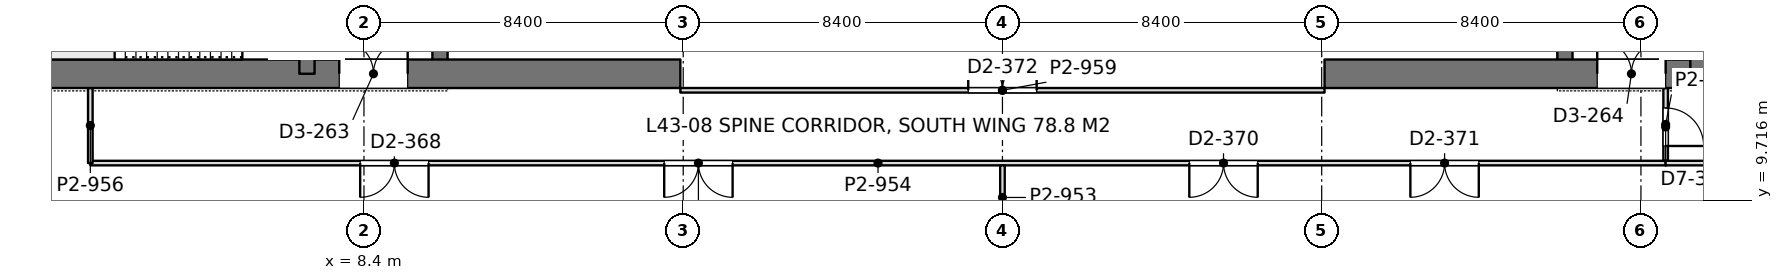
"""IFC4 building model, lengths in metres.
Left out: names, types, materials, properties, quantities, classifications, styles, units other than length and angle.
Written with IfcOpenShell. Run it as: python <this file> out.ifc"""

import sys

from ifc_helpers import new_model, si_unit, direction, frame, frame_2d, origin, place, context, subcontext, project, spatial, rectangle, extrude, element, fill, save


model = new_model("IFC4")
c1 = context("Model", 3, precision=1e-05, world=origin(), true_north=direction((0.0, 1.0)))
c2 = subcontext(c1, "Body", "Model", "MODEL_VIEW")
j1 = project(units=[si_unit("LENGTHUNIT", "METRE"), si_unit("PLANEANGLEUNIT", "RADIAN")], contexts=[c1])
p1 = place(None, origin())
s1 = spatial("IfcSite", under=j1, at=p1, CompositionType="ELEMENT")
p2 = place(p1, origin())
s2 = spatial("IfcBuilding", under=s1, at=p2, CompositionType="ELEMENT")
p3 = place(p2, frame((0.0, 0.0, 190.2)))
s3 = spatial("IfcBuildingStorey", under=s2, at=p3, CompositionType="ELEMENT", Elevation=190.2)
p4 = place(p3, frame((-1.125, 13.05, 0.0), z_axis=(0.0, 0.0, 1.0), x_axis=(1.0, 0.0, 0.0)))
e1 = element("IfcWall", 1, at=p4, inside=s3, PredefinedType="SHEAR", context=c2, shape_type="SweptSolid", body=[
    extrude(rectangle(XDim=17.85, YDim=0.75, at=frame_2d((8.925, 0.0))), origin(), (0.0, 0.0, 1.0), 4.2),
])
p5 = place(p4, frame((8.875, 0.0, 0.0)))
e2 = element("IfcOpeningElement", 2, at=p5, cuts=e1, PredefinedType="OPENING", context=c2, shape_type="SweptSolid", body=[
    extrude(rectangle(XDim=1.8, YDim=2.4, at=frame_2d((0.9, 1.2))), frame((0.0, 0.385, 0.0), z_axis=(0.0, -1.0, 0.0), x_axis=(1.0, 0.0, 0.0)), (0.0, 0.0, 1.0), 0.77),
])
p6 = place(p3, frame((6.9, 13.05, 0.0), z_axis=(0.0, 0.0, 1.0), x_axis=(0.0, 1.0, 0.0)))
e3 = element("IfcWall", 3, at=p6, inside=s3, PredefinedType="SHEAR", context=c2, shape_type="SweptSolid", body=[
    extrude(rectangle(XDim=24.3, YDim=0.4, at=frame_2d((12.15, 0.0))), origin(), (0.0, 0.0, 1.0), 4.2),
])
p7 = place(p6, frame((1.3, 0.0, 0.0)))
e4 = element("IfcOpeningElement", 4, at=p7, cuts=e3, PredefinedType="OPENING", context=c2, shape_type="SweptSolid", body=[
    extrude(rectangle(XDim=1.0, YDim=2.2, at=frame_2d((0.5, 1.1))), frame((0.0, 0.21, 0.0), z_axis=(0.0, -1.0, 0.0), x_axis=(1.0, 0.0, 0.0)), (0.0, 0.0, 1.0), 0.42),
])
p8 = place(p6, frame((22.0, 0.0, 0.0)))
e5 = element("IfcOpeningElement", 5, at=p8, cuts=e3, PredefinedType="OPENING", context=c2, shape_type="SweptSolid", body=[
    extrude(rectangle(XDim=1.0, YDim=2.2, at=frame_2d((0.5, 1.1))), frame((0.0, 0.21, 0.0), z_axis=(0.0, -1.0, 0.0), x_axis=(1.0, 0.0, 0.0)), (0.0, 0.0, 1.0), 0.42),
])
p9 = place(p6, frame((5.55, 0.0, 0.0)))
e6 = element("IfcOpeningElement", 6, at=p9, cuts=e3, PredefinedType="OPENING", context=c2, shape_type="SweptSolid", body=[
    extrude(rectangle(XDim=1.0, YDim=2.2, at=frame_2d((0.5, 1.1))), frame((0.0, 0.21, 0.0), z_axis=(0.0, -1.0, 0.0), x_axis=(1.0, 0.0, 0.0)), (0.0, 0.0, 1.0), 0.42),
])
p10 = place(p6, frame((9.55, 0.0, 0.0)))
e7 = element("IfcOpeningElement", 7, at=p10, cuts=e3, PredefinedType="OPENING", context=c2, shape_type="SweptSolid", body=[
    extrude(rectangle(XDim=1.0, YDim=2.2, at=frame_2d((0.5, 1.1))), frame((0.0, 0.21, 0.0), z_axis=(0.0, -1.0, 0.0), x_axis=(1.0, 0.0, 0.0)), (0.0, 0.0, 1.0), 0.42),
])
p11 = place(p6, frame((12.8, 0.0, 0.0)))
e8 = element("IfcOpeningElement", 8, at=p11, cuts=e3, PredefinedType="OPENING", context=c2, shape_type="SweptSolid", body=[
    extrude(rectangle(XDim=1.1, YDim=2.2, at=frame_2d((0.55, 1.1))), frame((0.0, 0.21, 0.0), z_axis=(0.0, -1.0, 0.0), x_axis=(1.0, 0.0, 0.0)), (0.0, 0.0, 1.0), 0.42),
])
p12 = place(p6, frame((15.538, 0.0, 0.0)))
e9 = element("IfcOpeningElement", 9, at=p12, cuts=e3, PredefinedType="OPENING", context=c2, shape_type="SweptSolid", body=[
    extrude(rectangle(XDim=1.1, YDim=2.2, at=frame_2d((0.55, 1.1))), frame((0.0, 0.21, 0.0), z_axis=(0.0, -1.0, 0.0), x_axis=(1.0, 0.0, 0.0)), (0.0, 0.0, 1.0), 0.42),
])
p13 = place(p6, frame((18.262, 0.0, 0.0)))
e10 = element("IfcOpeningElement", 10, at=p13, cuts=e3, PredefinedType="OPENING", context=c2, shape_type="SweptSolid", body=[
    extrude(rectangle(XDim=1.1, YDim=2.2, at=frame_2d((0.55, 1.1))), frame((0.0, 0.21, 0.0), z_axis=(0.0, -1.0, 0.0), x_axis=(1.0, 0.0, 0.0)), (0.0, 0.0, 1.0), 0.42),
])
p14 = place(p3, frame((10.4, 13.05, 0.0), z_axis=(0.0, 0.0, 1.0), x_axis=(0.0, 1.0, 0.0)))
e11 = element("IfcWall", 11, at=p14, inside=s3, PredefinedType="SHEAR", context=c2, shape_type="SweptSolid", body=[
    extrude(rectangle(XDim=24.3, YDim=0.4, at=frame_2d((12.15, 0.0))), origin(), (0.0, 0.0, 1.0), 4.2),
])
p15 = place(p14, frame((15.75, 0.0, 0.0)))
e12 = element("IfcOpeningElement", 12, at=p15, cuts=e11, PredefinedType="OPENING", context=c2, shape_type="SweptSolid", body=[
    extrude(rectangle(XDim=1.1, YDim=2.2, at=frame_2d((0.55, 1.1))), frame((0.0, 0.21, 0.0), z_axis=(0.0, -1.0, 0.0), x_axis=(1.0, 0.0, 0.0)), (0.0, 0.0, 1.0), 0.42),
])
p16 = place(p14, frame((18.6, 0.0, 0.0)))
e13 = element("IfcOpeningElement", 13, at=p16, cuts=e11, PredefinedType="OPENING", context=c2, shape_type="SweptSolid", body=[
    extrude(rectangle(XDim=1.1, YDim=2.2, at=frame_2d((0.55, 1.1))), frame((0.0, 0.21, 0.0), z_axis=(0.0, -1.0, 0.0), x_axis=(1.0, 0.0, 0.0)), (0.0, 0.0, 1.0), 0.42),
])
p17 = place(p14, frame((21.45, 0.0, 0.0)))
e14 = element("IfcOpeningElement", 14, at=p17, cuts=e11, PredefinedType="OPENING", context=c2, shape_type="SweptSolid", body=[
    extrude(rectangle(XDim=1.1, YDim=2.2, at=frame_2d((0.55, 1.1))), frame((0.0, 0.21, 0.0), z_axis=(0.0, -1.0, 0.0), x_axis=(1.0, 0.0, 0.0)), (0.0, 0.0, 1.0), 0.42),
])
p18 = place(p14, frame((8.65, 0.0, 0.0)))
e15 = element("IfcOpeningElement", 15, at=p18, cuts=e11, PredefinedType="OPENING", context=c2, shape_type="SweptSolid", body=[
    extrude(rectangle(XDim=1.8, YDim=2.4, at=frame_2d((0.9, 1.2))), frame((0.0, 0.21, 0.0), z_axis=(0.0, -1.0, 0.0), x_axis=(1.0, 0.0, 0.0)), (0.0, 0.0, 1.0), 0.42),
])
p19 = place(p3, frame((33.675, 13.05, 0.0), z_axis=(0.0, 0.0, 1.0), x_axis=(1.0, 0.0, 0.0)))
e16 = element("IfcWall", 16, at=p19, inside=s3, PredefinedType="SHEAR", context=c2, shape_type="SweptSolid", body=[
    extrude(rectangle(XDim=17.85, YDim=0.75, at=frame_2d((8.925, 0.0))), origin(), (0.0, 0.0, 1.0), 4.2),
])
p20 = place(p19, frame((7.175, 0.0, 0.0)))
e17 = element("IfcOpeningElement", 17, at=p20, cuts=e16, PredefinedType="OPENING", context=c2, shape_type="SweptSolid", body=[
    extrude(rectangle(XDim=1.8, YDim=2.4, at=frame_2d((0.9, 1.2))), frame((0.0, 0.385, 0.0), z_axis=(0.0, -1.0, 0.0), x_axis=(1.0, 0.0, 0.0)), (0.0, 0.0, 1.0), 0.77),
])
p21 = place(p3, frame((43.5, 13.05, 0.0), z_axis=(0.0, 0.0, 1.0), x_axis=(0.0, 1.0, 0.0)))
e18 = element("IfcWall", 18, at=p21, inside=s3, PredefinedType="SHEAR", context=c2, shape_type="SweptSolid", body=[
    extrude(rectangle(XDim=24.3, YDim=0.4, at=frame_2d((12.15, 0.0))), origin(), (0.0, 0.0, 1.0), 4.2),
])
p22 = place(p21, frame((1.3, 0.0, 0.0)))
e19 = element("IfcOpeningElement", 19, at=p22, cuts=e18, PredefinedType="OPENING", context=c2, shape_type="SweptSolid", body=[
    extrude(rectangle(XDim=1.0, YDim=2.2, at=frame_2d((0.5, 1.1))), frame((0.0, 0.21, 0.0), z_axis=(0.0, -1.0, 0.0), x_axis=(1.0, 0.0, 0.0)), (0.0, 0.0, 1.0), 0.42),
])
p23 = place(p21, frame((22.0, 0.0, 0.0)))
e20 = element("IfcOpeningElement", 20, at=p23, cuts=e18, PredefinedType="OPENING", context=c2, shape_type="SweptSolid", body=[
    extrude(rectangle(XDim=1.0, YDim=2.2, at=frame_2d((0.5, 1.1))), frame((0.0, 0.21, 0.0), z_axis=(0.0, -1.0, 0.0), x_axis=(1.0, 0.0, 0.0)), (0.0, 0.0, 1.0), 0.42),
])
p24 = place(p21, frame((5.55, 0.0, 0.0)))
e21 = element("IfcOpeningElement", 21, at=p24, cuts=e18, PredefinedType="OPENING", context=c2, shape_type="SweptSolid", body=[
    extrude(rectangle(XDim=1.0, YDim=2.2, at=frame_2d((0.5, 1.1))), frame((0.0, 0.21, 0.0), z_axis=(0.0, -1.0, 0.0), x_axis=(1.0, 0.0, 0.0)), (0.0, 0.0, 1.0), 0.42),
])
p25 = place(p21, frame((9.55, 0.0, 0.0)))
e22 = element("IfcOpeningElement", 22, at=p25, cuts=e18, PredefinedType="OPENING", context=c2, shape_type="SweptSolid", body=[
    extrude(rectangle(XDim=1.0, YDim=2.2, at=frame_2d((0.5, 1.1))), frame((0.0, 0.21, 0.0), z_axis=(0.0, -1.0, 0.0), x_axis=(1.0, 0.0, 0.0)), (0.0, 0.0, 1.0), 0.42),
])
p26 = place(p21, frame((12.8, 0.0, 0.0)))
e23 = element("IfcOpeningElement", 23, at=p26, cuts=e18, PredefinedType="OPENING", context=c2, shape_type="SweptSolid", body=[
    extrude(rectangle(XDim=1.1, YDim=2.2, at=frame_2d((0.55, 1.1))), frame((0.0, 0.21, 0.0), z_axis=(0.0, -1.0, 0.0), x_axis=(1.0, 0.0, 0.0)), (0.0, 0.0, 1.0), 0.42),
])
p27 = place(p21, frame((15.538, 0.0, 0.0)))
e24 = element("IfcOpeningElement", 24, at=p27, cuts=e18, PredefinedType="OPENING", context=c2, shape_type="SweptSolid", body=[
    extrude(rectangle(XDim=1.1, YDim=2.2, at=frame_2d((0.55, 1.1))), frame((0.0, 0.21, 0.0), z_axis=(0.0, -1.0, 0.0), x_axis=(1.0, 0.0, 0.0)), (0.0, 0.0, 1.0), 0.42),
])
p28 = place(p21, frame((18.262, 0.0, 0.0)))
e25 = element("IfcOpeningElement", 25, at=p28, cuts=e18, PredefinedType="OPENING", context=c2, shape_type="SweptSolid", body=[
    extrude(rectangle(XDim=1.1, YDim=2.2, at=frame_2d((0.55, 1.1))), frame((0.0, 0.21, 0.0), z_axis=(0.0, -1.0, 0.0), x_axis=(1.0, 0.0, 0.0)), (0.0, 0.0, 1.0), 0.42),
])
p29 = place(p3, frame((40.0, 13.05, 0.0), z_axis=(0.0, 0.0, 1.0), x_axis=(0.0, 1.0, 0.0)))
e26 = element("IfcWall", 26, at=p29, inside=s3, PredefinedType="SHEAR", context=c2, shape_type="SweptSolid", body=[
    extrude(rectangle(XDim=24.3, YDim=0.4, at=frame_2d((12.15, 0.0))), origin(), (0.0, 0.0, 1.0), 4.2),
])
p30 = place(p29, frame((15.75, 0.0, 0.0)))
e27 = element("IfcOpeningElement", 27, at=p30, cuts=e26, PredefinedType="OPENING", context=c2, shape_type="SweptSolid", body=[
    extrude(rectangle(XDim=1.1, YDim=2.2, at=frame_2d((0.55, 1.1))), frame((0.0, 0.21, 0.0), z_axis=(0.0, -1.0, 0.0), x_axis=(1.0, 0.0, 0.0)), (0.0, 0.0, 1.0), 0.42),
])
p31 = place(p29, frame((18.6, 0.0, 0.0)))
e28 = element("IfcOpeningElement", 28, at=p31, cuts=e26, PredefinedType="OPENING", context=c2, shape_type="SweptSolid", body=[
    extrude(rectangle(XDim=1.1, YDim=2.2, at=frame_2d((0.55, 1.1))), frame((0.0, 0.21, 0.0), z_axis=(0.0, -1.0, 0.0), x_axis=(1.0, 0.0, 0.0)), (0.0, 0.0, 1.0), 0.42),
])
p32 = place(p29, frame((21.45, 0.0, 0.0)))
e29 = element("IfcOpeningElement", 29, at=p32, cuts=e26, PredefinedType="OPENING", context=c2, shape_type="SweptSolid", body=[
    extrude(rectangle(XDim=1.1, YDim=2.2, at=frame_2d((0.55, 1.1))), frame((0.0, 0.21, 0.0), z_axis=(0.0, -1.0, 0.0), x_axis=(1.0, 0.0, 0.0)), (0.0, 0.0, 1.0), 0.42),
])
p33 = place(p29, frame((8.65, 0.0, 0.0)))
e30 = element("IfcOpeningElement", 30, at=p33, cuts=e26, PredefinedType="OPENING", context=c2, shape_type="SweptSolid", body=[
    extrude(rectangle(XDim=1.8, YDim=2.4, at=frame_2d((0.9, 1.2))), frame((0.0, 0.21, 0.0), z_axis=(0.0, -1.0, 0.0), x_axis=(1.0, 0.0, 0.0)), (0.0, 0.0, 1.0), 0.42),
])
p34 = place(p3, frame((25.2, 8.949, 0.0), z_axis=(0.0, 0.0, 1.0), x_axis=(0.0, 1.0, 0.0)))
e31 = element("IfcWall", 31, at=p34, inside=s3, PredefinedType="PARTITIONING", context=c2, shape_type="SweptSolid", body=[
    extrude(rectangle(XDim=1.693, YDim=0.12, at=frame_2d((0.847, 0.0))), origin(), (0.0, 0.0, 1.0), 3.55),
])
p35 = place(p3, frame((1.2, 10.7, 0.0), z_axis=(0.0, 0.0, 1.0), x_axis=(1.0, 0.0, 0.0)))
e32 = element("IfcWall", 32, at=p35, inside=s3, PredefinedType="PARTITIONING", context=c2, shape_type="SweptSolid", body=[
    extrude(rectangle(XDim=41.452, YDim=0.12, at=frame_2d((20.726, 0.0))), origin(), (0.0, 0.0, 1.0), 3.55),
])
p36 = place(p35, frame((7.1, 0.0, 0.0)))
e33 = element("IfcOpeningElement", 33, at=p36, cuts=e32, PredefinedType="OPENING", context=c2, shape_type="SweptSolid", body=[
    extrude(rectangle(XDim=1.8, YDim=2.2, at=frame_2d((0.9, 1.1))), frame((0.0, 0.07, 0.0), z_axis=(0.0, -1.0, 0.0), x_axis=(1.0, 0.0, 0.0)), (0.0, 0.0, 1.0), 0.14),
])
p37 = place(p35, frame((15.1, 0.0, 0.0)))
e34 = element("IfcOpeningElement", 34, at=p37, cuts=e32, PredefinedType="OPENING", context=c2, shape_type="SweptSolid", body=[
    extrude(rectangle(XDim=1.8, YDim=2.2, at=frame_2d((0.9, 1.1))), frame((0.0, 0.07, 0.0), z_axis=(0.0, -1.0, 0.0), x_axis=(1.0, 0.0, 0.0)), (0.0, 0.0, 1.0), 0.14),
])
p38 = place(p35, frame((28.917, 0.0, 0.0)))
e35 = element("IfcOpeningElement", 35, at=p38, cuts=e32, PredefinedType="OPENING", context=c2, shape_type="SweptSolid", body=[
    extrude(rectangle(XDim=1.8, YDim=2.2, at=frame_2d((0.9, 1.1))), frame((0.0, 0.07, 0.0), z_axis=(0.0, -1.0, 0.0), x_axis=(1.0, 0.0, 0.0)), (0.0, 0.0, 1.0), 0.14),
])
p39 = place(p35, frame((34.733, 0.0, 0.0)))
e36 = element("IfcOpeningElement", 36, at=p39, cuts=e32, PredefinedType="OPENING", context=c2, shape_type="SweptSolid", body=[
    extrude(rectangle(XDim=1.8, YDim=2.2, at=frame_2d((0.9, 1.1))), frame((0.0, 0.07, 0.0), z_axis=(0.0, -1.0, 0.0), x_axis=(1.0, 0.0, 0.0)), (0.0, 0.0, 1.0), 0.14),
])
p40 = place(p3, frame((1.2, 10.7, 0.0), z_axis=(0.0, 0.0, 1.0), x_axis=(0.0, 1.0, 0.0)))
e37 = element("IfcWall", 37, at=p40, inside=s3, PredefinedType="PARTITIONING", context=c2, shape_type="SweptSolid", body=[
    extrude(rectangle(XDim=1.976, YDim=0.12, at=frame_2d((0.988, 0.0))), origin(), (0.0, 0.0, 1.0), 4.05),
])
p41 = place(p3, frame((42.65, 10.758, 0.0), z_axis=(0.0, 0.0, 1.0), x_axis=(0.0, 1.0, 0.0)))
e38 = element("IfcWall", 38, at=p41, inside=s3, PredefinedType="PARTITIONING", context=c2, shape_type="SweptSolid", body=[
    extrude(rectangle(XDim=1.918, YDim=0.12, at=frame_2d((0.959, 0.0))), origin(), (0.0, 0.0, 1.0), 4.05),
])
p42 = place(p41, frame((0.392, 0.0, 0.0)))
e39 = element("IfcOpeningElement", 39, at=p42, cuts=e38, PredefinedType="OPENING", context=c2, shape_type="SweptSolid", body=[
    extrude(rectangle(XDim=1.0, YDim=2.4, at=frame_2d((0.5, 1.2))), frame((0.0, 0.07, 0.0), z_axis=(0.0, -1.0, 0.0), x_axis=(1.0, 0.0, 0.0)), (0.0, 0.0, 1.0), 0.14),
])
p43 = place(p3, frame((42.648, 10.7, 0.0), z_axis=(0.0, 0.0, 1.0), x_axis=(1.0, 0.0, 0.0)))
e40 = element("IfcWall", 40, at=p43, inside=s3, PredefinedType="PARTITIONING", context=c2, shape_type="SweptSolid", body=[
    extrude(rectangle(XDim=6.552, YDim=0.12, at=frame_2d((3.276, 0.0))), origin(), (0.0, 0.0, 1.0), 4.05),
])
p44 = place(p3, frame((16.725, 12.615, 0.0), z_axis=(0.0, 0.0, 1.0), x_axis=(1.0, 0.0, 0.0)))
e41 = element("IfcWall", 41, at=p44, inside=s3, PredefinedType="PARTITIONING", context=c2, shape_type="SweptSolid", body=[
    extrude(rectangle(XDim=16.95, YDim=0.12, at=frame_2d((8.475, 0.0))), origin(), (0.0, 0.0, 1.0), 3.55),
])
p45 = place(p44, frame((7.575, 0.0, 0.0)))
e42 = element("IfcOpeningElement", 42, at=p45, cuts=e41, PredefinedType="OPENING", context=c2, shape_type="SweptSolid", body=[
    extrude(rectangle(XDim=1.8, YDim=2.2, at=frame_2d((0.9, 1.1))), frame((0.0, 0.07, 0.0), z_axis=(0.0, -1.0, 0.0), x_axis=(1.0, 0.0, 0.0)), (0.0, 0.0, 1.0), 0.14),
])
p46 = place(p5, origin())
e43 = element("IfcDoor", 43, at=p46, inside=s3, OperationType="DOUBLE_DOOR_SINGLE_SWING", PredefinedType="DOOR", context=c2, shape_type="SweptSolid", body=[
    extrude(rectangle(XDim=1.8, YDim=2.4, at=frame_2d((0.9, 1.2))), frame((0.0, 0.025, 0.0), z_axis=(0.0, -1.0, 0.0), x_axis=(1.0, 0.0, 0.0)), (0.0, 0.0, 1.0), 0.05),
])
fill(e2, e43)
p47 = place(p20, origin())
e44 = element("IfcDoor", 44, at=p47, inside=s3, OperationType="DOUBLE_DOOR_SINGLE_SWING", PredefinedType="DOOR", context=c2, shape_type="SweptSolid", body=[
    extrude(rectangle(XDim=1.8, YDim=2.4, at=frame_2d((0.9, 1.2))), frame((0.0, 0.025, 0.0), z_axis=(0.0, -1.0, 0.0), x_axis=(1.0, 0.0, 0.0)), (0.0, 0.0, 1.0), 0.05),
])
fill(e17, e44)
p48 = place(p36, frame((1.8, 0.0, 0.0), z_axis=(0.0, 0.0, 1.0), x_axis=(-1.0, 0.0, 0.0)))
e45 = element("IfcDoor", 45, at=p48, inside=s3, OperationType="DOUBLE_DOOR_SINGLE_SWING", PredefinedType="DOOR", context=c2, shape_type="SweptSolid", body=[
    extrude(rectangle(XDim=1.8, YDim=2.2, at=frame_2d((0.9, 1.1))), frame((0.0, 0.025, 0.0), z_axis=(0.0, -1.0, 0.0), x_axis=(1.0, 0.0, 0.0)), (0.0, 0.0, 1.0), 0.05),
])
fill(e33, e45)
p49 = place(p37, frame((1.8, 0.0, 0.0), z_axis=(0.0, 0.0, 1.0), x_axis=(-1.0, 0.0, 0.0)))
e46 = element("IfcDoor", 46, at=p49, inside=s3, OperationType="DOUBLE_DOOR_SINGLE_SWING", PredefinedType="DOOR", context=c2, shape_type="SweptSolid", body=[
    extrude(rectangle(XDim=1.8, YDim=2.2, at=frame_2d((0.9, 1.1))), frame((0.0, 0.025, 0.0), z_axis=(0.0, -1.0, 0.0), x_axis=(1.0, 0.0, 0.0)), (0.0, 0.0, 1.0), 0.05),
])
fill(e34, e46)
p50 = place(p38, frame((1.8, 0.0, 0.0), z_axis=(0.0, 0.0, 1.0), x_axis=(-1.0, 0.0, 0.0)))
e47 = element("IfcDoor", 47, at=p50, inside=s3, OperationType="DOUBLE_DOOR_SINGLE_SWING", PredefinedType="DOOR", context=c2, shape_type="SweptSolid", body=[
    extrude(rectangle(XDim=1.8, YDim=2.2, at=frame_2d((0.9, 1.1))), frame((0.0, 0.025, 0.0), z_axis=(0.0, -1.0, 0.0), x_axis=(1.0, 0.0, 0.0)), (0.0, 0.0, 1.0), 0.05),
])
fill(e35, e47)
p51 = place(p39, frame((1.8, 0.0, 0.0), z_axis=(0.0, 0.0, 1.0), x_axis=(-1.0, 0.0, 0.0)))
e48 = element("IfcDoor", 48, at=p51, inside=s3, OperationType="DOUBLE_DOOR_SINGLE_SWING", PredefinedType="DOOR", context=c2, shape_type="SweptSolid", body=[
    extrude(rectangle(XDim=1.8, YDim=2.2, at=frame_2d((0.9, 1.1))), frame((0.0, 0.025, 0.0), z_axis=(0.0, -1.0, 0.0), x_axis=(1.0, 0.0, 0.0)), (0.0, 0.0, 1.0), 0.05),
])
fill(e36, e48)
p52 = place(p42, frame((1.0, 0.0, 0.0), z_axis=(0.0, 0.0, 1.0), x_axis=(-1.0, 0.0, 0.0)))
e49 = element("IfcDoor", 49, at=p52, inside=s3, OperationType="SINGLE_SWING_RIGHT", PredefinedType="DOOR", context=c2, shape_type="SweptSolid", body=[
    extrude(rectangle(XDim=1.0, YDim=2.4, at=frame_2d((0.5, 1.2))), frame((0.0, 0.025, 0.0), z_axis=(0.0, -1.0, 0.0), x_axis=(1.0, 0.0, 0.0)), (0.0, 0.0, 1.0), 0.05),
])
fill(e39, e49)
p53 = place(p45, origin())
e50 = element("IfcDoor", 50, at=p53, inside=s3, OperationType="DOUBLE_DOOR_SINGLE_SWING", PredefinedType="DOOR", context=c2, shape_type="SweptSolid", body=[
    extrude(rectangle(XDim=1.8, YDim=2.2, at=frame_2d((0.9, 1.1))), frame((0.0, 0.025, 0.0), z_axis=(0.0, -1.0, 0.0), x_axis=(1.0, 0.0, 0.0)), (0.0, 0.0, 1.0), 0.05),
])
fill(e42, e50)
save(model, sys.argv[1])
